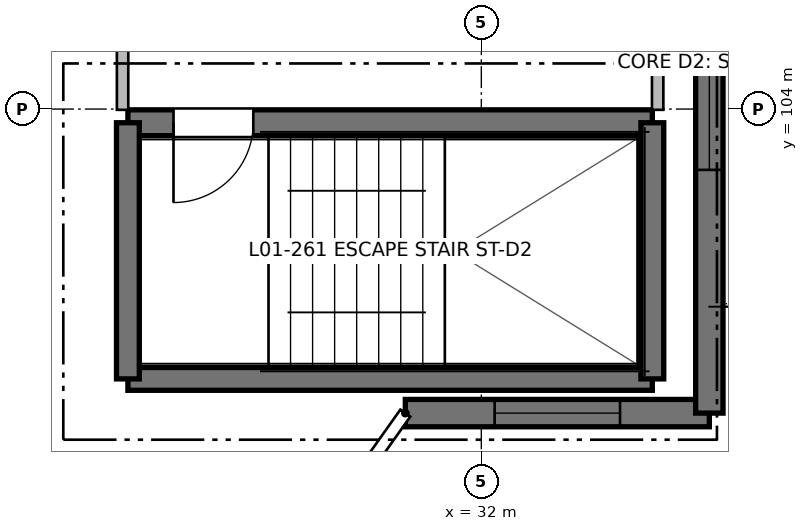
"""IFC4 building model, lengths in metres.
Left out: names, types, materials, properties, quantities, classifications, styles, units other than length and angle.
Written with IfcOpenShell. Run it as: python <this file> out.ifc"""

import sys

from ifc_helpers import new_model, si_unit, direction, frame, frame_2d, origin, place, context, subcontext, project, spatial, rectangle, extrude, element, fill, save


model = new_model("IFC4")
c1 = context("Model", 3, precision=1e-05, world=origin(), true_north=direction((0.0, 1.0)))
c2 = subcontext(c1, "Body", "Model", "MODEL_VIEW")
j1 = project(units=[si_unit("LENGTHUNIT", "METRE"), si_unit("PLANEANGLEUNIT", "RADIAN")], contexts=[c1])
p1 = place(None, origin())
s1 = spatial("IfcSite", under=j1, at=p1, CompositionType="ELEMENT")
p2 = place(p1, origin())
s2 = spatial("IfcBuilding", under=s1, at=p2, CompositionType="ELEMENT")
p3 = place(p2, frame((0.0, 0.0, 4.16)))
s3 = spatial("IfcBuildingStorey", under=s2, at=p3, CompositionType="ELEMENT", Elevation=4.16)
p4 = place(p3, frame((27.35, 100.45, 0.0), z_axis=(0.0, 0.0, 1.0), x_axis=(1.0, 0.0, 0.0)))
e1 = element("IfcWall", 1, at=p4, inside=s3, PredefinedType="SHEAR", context=c2, shape_type="SweptSolid", body=[
    extrude(rectangle(XDim=6.9, YDim=0.3, at=frame_2d((3.45, 0.0))), origin(), (0.0, 0.0, 1.0), 3.2),
])
p5 = place(p3, frame((34.25, 103.82, 0.0), z_axis=(0.0, 0.0, 1.0), x_axis=(-1.0, 0.0, 0.0)))
e2 = element("IfcWall", 2, at=p5, inside=s3, PredefinedType="SHEAR", context=c2, shape_type="SweptSolid", body=[
    extrude(rectangle(XDim=6.9, YDim=0.34, at=frame_2d((3.45, 0.0))), origin(), (0.0, 0.0, 1.0), 3.2),
])
p6 = place(p5, frame((5.25, 0.0, 0.0)))
e3 = element("IfcOpeningElement", 3, at=p6, cuts=e2, PredefinedType="OPENING", context=c2, shape_type="SweptSolid", body=[
    extrude(rectangle(XDim=1.05, YDim=2.15, at=frame_2d((0.525, 1.075))), frame((0.0, 0.18, 0.0), z_axis=(0.0, -1.0, 0.0), x_axis=(1.0, 0.0, 0.0)), (0.0, 0.0, 1.0), 0.36),
])
for number, where, z_axis, x_axis in (
    (4, (27.35, 103.82, 0.0), (0.0, 0.0, 1.0), (0.0, -1.0, 0.0)),
    (5, (34.25, 100.45, 0.0), (0.0, 0.0, 1.0), (0.0, 1.0, 0.0)),
):
    element("IfcWall", number, at=place(p3, frame(where, z_axis=z_axis, x_axis=x_axis)), inside=s3, PredefinedType="SHEAR", context=c2, shape_type="SweptSolid", body=[
        extrude(rectangle(XDim=3.37, YDim=0.3, at=frame_2d((1.685, 0.0))), origin(), (0.0, 0.0, 1.0), 3.2),
    ])
p7 = place(p3, frame((35.0, 100.0, 0.0), z_axis=(0.0, 0.0, 1.0), x_axis=(-1.0, 0.0, 0.0)))
e6 = element("IfcWall", 6, at=p7, inside=s3, PredefinedType="SHEAR", context=c2, shape_type="SweptSolid", body=[
    extrude(rectangle(XDim=4.0, YDim=0.36, at=frame_2d((2.0, 0.0))), origin(), (0.0, 0.0, 1.0), 2.98),
])
p8 = place(p7, frame((1.175, 0.0, 0.77)))
e7 = element("IfcOpeningElement", 7, at=p8, cuts=e6, PredefinedType="OPENING", context=c2, shape_type="SweptSolid", body=[
    extrude(rectangle(XDim=1.65, YDim=1.45, at=frame_2d((0.825, 0.725))), frame((0.0, 0.19, 0.0), z_axis=(0.0, -1.0, 0.0), x_axis=(1.0, 0.0, 0.0)), (0.0, 0.0, 1.0), 0.38),
])
p9 = place(p3, frame((35.0, 116.0, 0.0), z_axis=(0.0, 0.0, 1.0), x_axis=(0.0, -1.0, 0.0)))
e8 = element("IfcWall", 8, at=p9, inside=s3, PredefinedType="SHEAR", context=c2, shape_type="SweptSolid", body=[
    extrude(rectangle(XDim=16.0, YDim=0.36, at=frame_2d((8.0, 0.0))), origin(), (0.0, 0.0, 1.0), 2.98),
])
p10 = place(p9, frame((2.95, 0.0, 0.0)))
e9 = element("IfcOpeningElement", 9, at=p10, cuts=e8, PredefinedType="OPENING", context=c2, shape_type="SweptSolid", body=[
    extrude(rectangle(XDim=1.2, YDim=2.2, at=frame_2d((0.6, 1.1))), frame((0.0, 0.19, 0.0), z_axis=(0.0, -1.0, 0.0), x_axis=(1.0, 0.0, 0.0)), (0.0, 0.0, 1.0), 0.38),
])
p11 = place(p9, frame((7.1, 0.0, 0.77)))
e10 = element("IfcOpeningElement", 10, at=p11, cuts=e8, PredefinedType="OPENING", context=c2, shape_type="SweptSolid", body=[
    extrude(rectangle(XDim=1.6, YDim=1.45, at=frame_2d((0.8, 0.725))), frame((0.0, 0.19, 0.0), z_axis=(0.0, -1.0, 0.0), x_axis=(1.0, 0.0, 0.0)), (0.0, 0.0, 1.0), 0.38),
])
p12 = place(p9, frame((11.2, 0.0, 0.77)))
e11 = element("IfcOpeningElement", 11, at=p12, cuts=e8, PredefinedType="OPENING", context=c2, shape_type="SweptSolid", body=[
    extrude(rectangle(XDim=1.6, YDim=1.45, at=frame_2d((0.8, 0.725))), frame((0.0, 0.19, 0.0), z_axis=(0.0, -1.0, 0.0), x_axis=(1.0, 0.0, 0.0)), (0.0, 0.0, 1.0), 0.38),
])
for number, where, z_axis, x_axis in (
    (12, (27.28, 103.99, 0.0), (0.0, 0.0, 1.0), (0.0, 1.0, 0.0)),
    (13, (34.32, 103.99, 0.0), (0.0, 0.0, 1.0), (0.0, 1.0, 0.0)),
):
    element("IfcWall", number, at=place(p3, frame(where, z_axis=z_axis, x_axis=x_axis)), inside=s3, PredefinedType="PARTITIONING", context=c2, shape_type="SweptSolid", body=[
        extrude(rectangle(XDim=2.73, YDim=0.15, at=frame_2d((1.365, 0.0))), origin(), (0.0, 0.0, 1.0), 2.935),
    ])
p13 = place(p6, origin())
e14 = element("IfcDoor", 14, at=p13, inside=s3, OperationType="SINGLE_SWING_RIGHT", PredefinedType="DOOR", context=c2, shape_type="SweptSolid", body=[
    extrude(rectangle(XDim=1.05, YDim=2.15, at=frame_2d((0.525, 1.075))), frame((0.0, 0.025, 0.0), z_axis=(0.0, -1.0, 0.0), x_axis=(1.0, 0.0, 0.0)), (0.0, 0.0, 1.0), 0.05),
])
fill(e3, e14)
p14 = place(p8, origin())
e15 = element("IfcWindow", 15, at=p14, inside=s3, PartitioningType="SINGLE_PANEL", PredefinedType="WINDOW", context=c2, shape_type="SweptSolid", body=[
    extrude(rectangle(XDim=1.65, YDim=1.45, at=frame_2d((0.825, 0.725))), frame((0.0, 0.03, 0.0), z_axis=(0.0, -1.0, 0.0), x_axis=(1.0, 0.0, 0.0)), (0.0, 0.0, 1.0), 0.06),
])
fill(e7, e15)
p15 = place(p12, origin())
e16 = element("IfcWindow", 16, at=p15, inside=s3, PartitioningType="SINGLE_PANEL", PredefinedType="WINDOW", context=c2, shape_type="SweptSolid", body=[
    extrude(rectangle(XDim=1.6, YDim=1.45, at=frame_2d((0.8, 0.725))), frame((0.0, 0.03, 0.0), z_axis=(0.0, -1.0, 0.0), x_axis=(1.0, 0.0, 0.0)), (0.0, 0.0, 1.0), 0.06),
])
fill(e11, e16)
save(model, sys.argv[1])
